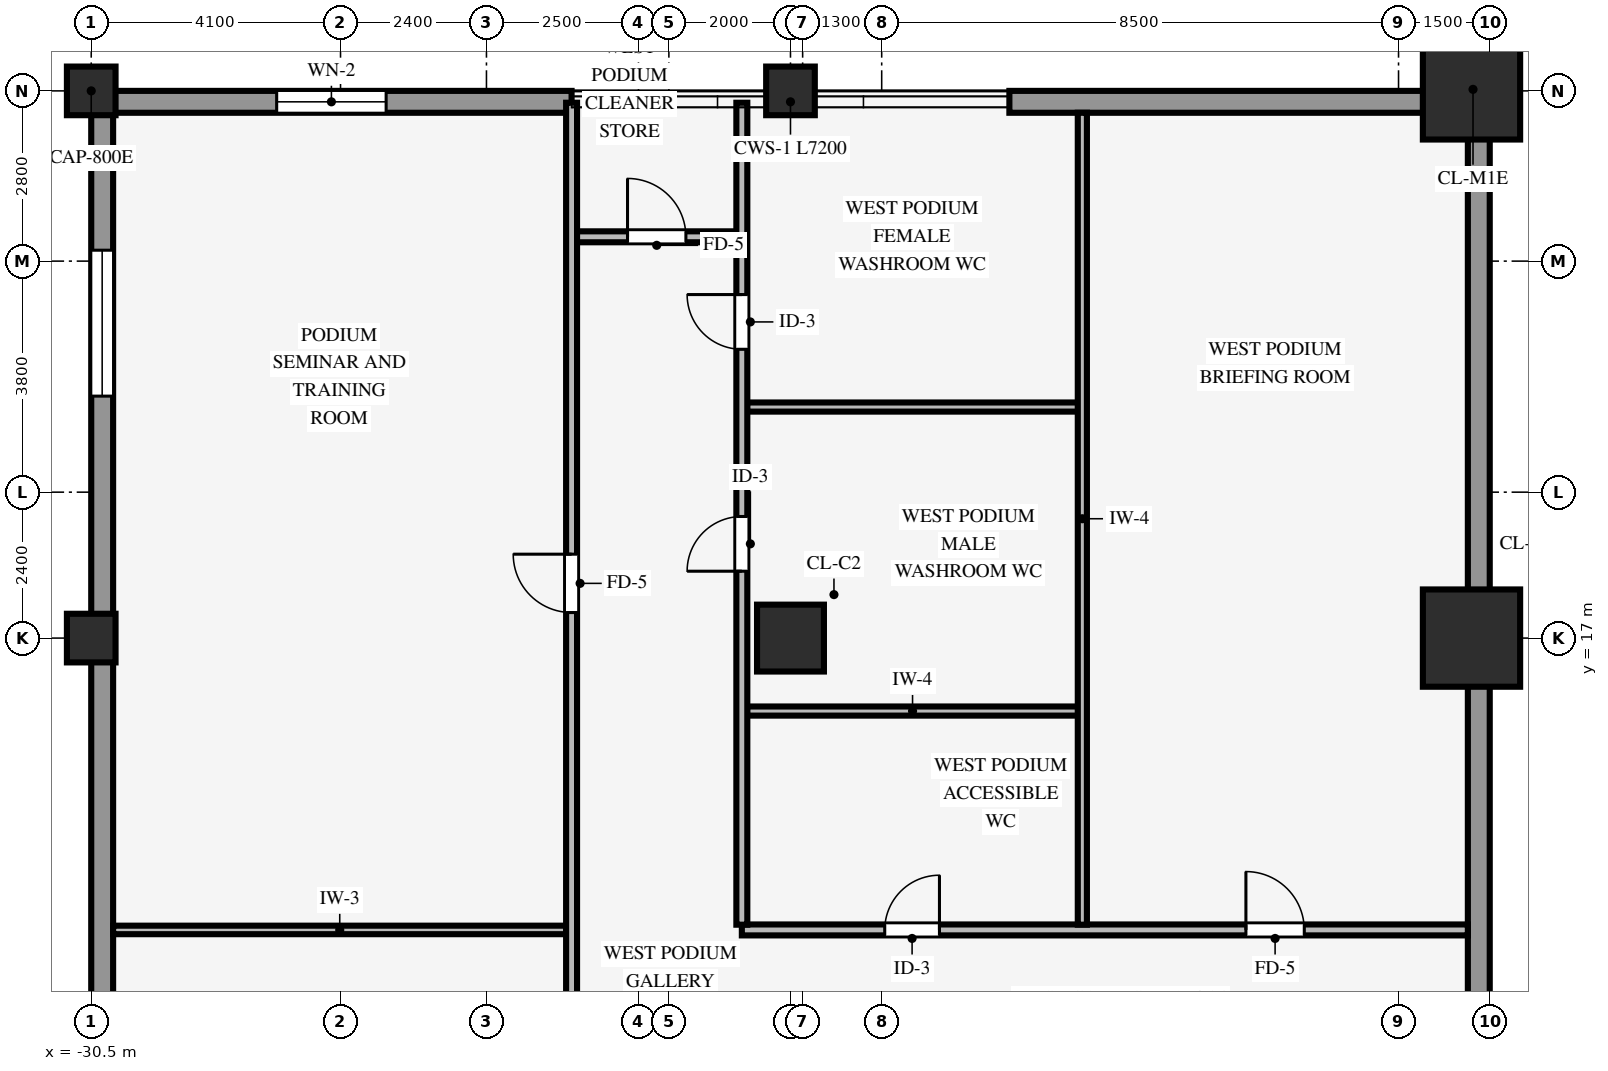
"""IFC4 building model, lengths in metres.
Left out: names, types, materials, properties, quantities, classifications, styles, units other than length and angle.
Written with IfcOpenShell. Run it as: python <this file> out.ifc"""

import sys

from ifc_helpers import new_model, si_unit, direction, frame, frame_2d, origin, origin_2d, place, context, subcontext, project, spatial, rectangle, hollow_rectangle, extrude, source, transform, mapped, element, fill, save


model = new_model("IFC4")
c1 = context("Model", 3, precision=1e-05, world=origin(), true_north=direction((0.0, 1.0)))
c2 = subcontext(c1, "Body", "Model", "MODEL_VIEW")
j1 = project(units=[si_unit("LENGTHUNIT", "METRE"), si_unit("PLANEANGLEUNIT", "RADIAN")], contexts=[c1])
p1 = place(None, origin())
s1 = spatial("IfcSite", under=j1, at=p1, CompositionType="ELEMENT")
p2 = place(p1, origin())
s2 = spatial("IfcBuilding", under=s1, at=p2, CompositionType="ELEMENT")
p3 = place(p2, frame((0.0, 0.0, 13.8)))
s3 = spatial("IfcBuildingStorey", under=s2, at=p3, CompositionType="ELEMENT", Elevation=13.8)
for number, where, z_axis, x_axis in (
    (1, (-7.8, 17.0, 0.0), (0.0, 0.0, 1.0), (1.0, 0.0, 0.0)),
    (2, (-7.8, 26.0, 0.0), (0.0, 0.0, 1.0), (1.0, 0.0, 0.0)),
):
    element("IfcColumn", number, at=place(p3, frame(where, z_axis=z_axis, x_axis=x_axis)), inside=s3, PredefinedType="COLUMN", context=c2, shape_type="SweptSolid", body=[
        extrude(rectangle(XDim=1.6, YDim=1.6, at=origin_2d()), origin(), (0.0, 0.0, 1.0), 4.2),
    ])
for number, where, z_axis, x_axis in (
    (3, (-30.5, 17.0, 0.0), (0.0, 0.0, 1.0), (1.0, 0.0, 0.0)),
    (4, (-30.5, 26.0, 0.0), (0.0, 0.0, 1.0), (1.0, 0.0, 0.0)),
):
    element("IfcColumn", number, at=place(p3, frame(where, z_axis=z_axis, x_axis=x_axis)), inside=s3, PredefinedType="COLUMN", context=c2, shape_type="SweptSolid", body=[
        extrude(hollow_rectangle(XDim=0.8, YDim=0.8, WallThickness=0.055, InnerFilletRadius=0.055, OuterFilletRadius=0.11, at=origin_2d()), origin(), (0.0, 0.0, 1.0), 4.2),
    ])
p4 = place(p3, frame((-19.0, 17.0, 0.0), z_axis=(0.0, 0.0, 1.0), x_axis=(1.0, 0.0, 0.0)))
e5 = element("IfcColumn", 5, at=p4, inside=s3, PredefinedType="COLUMN", context=c2, shape_type="SweptSolid", body=[
    extrude(rectangle(XDim=1.1, YDim=1.1, at=origin_2d()), origin(), (0.0, 0.0, 1.0), 4.2),
])
p5 = place(p3, frame((-19.0, 26.0, 0.0), z_axis=(0.0, 0.0, 1.0), x_axis=(1.0, 0.0, 0.0)))
e6 = element("IfcColumn", 6, at=p5, inside=s3, PredefinedType="COLUMN", context=c2, shape_type="SweptSolid", body=[
    extrude(hollow_rectangle(XDim=0.8, YDim=0.8, WallThickness=0.055, InnerFilletRadius=0.055, OuterFilletRadius=0.11, at=origin_2d()), origin(), (0.0, 0.0, 1.0), 4.2),
])
p6 = place(p3, frame((-7.68, -25.644, 0.0), z_axis=(0.0, 0.0, 1.0), x_axis=(0.0, 1.0, 0.0)))
e7 = element("IfcWall", 7, at=p6, inside=s3, PredefinedType="STANDARD", context=c2, shape_type="SweptSolid", body=[
    extrude(rectangle(XDim=51.288, YDim=0.36, at=frame_2d((25.644, 0.0))), origin(), (0.0, 0.0, 1.0), 2.985),
])
p7 = place(p3, frame((-30.5, 25.82, 0.0), z_axis=(0.0, 0.0, 1.0), x_axis=(1.0, 0.0, 0.0)))
e8 = element("IfcWall", 8, at=p7, inside=s3, PredefinedType="STANDARD", context=c2, shape_type="SweptSolid", body=[
    extrude(rectangle(XDim=7.9, YDim=0.36, at=frame_2d((3.95, 0.0))), origin(), (0.0, 0.0, 1.0), 3.535),
])
p8 = place(p7, frame((3.05, 0.0, 0.85)))
e9 = element("IfcOpeningElement", 9, at=p8, cuts=e8, PredefinedType="OPENING", context=c2, shape_type="SweptSolid", body=[
    extrude(rectangle(XDim=1.8, YDim=2.35, at=frame_2d((0.9, 1.175))), frame((0.0, 0.19, 0.0), z_axis=(0.0, -1.0, 0.0), x_axis=(1.0, 0.0, 0.0)), (0.0, 0.0, 1.0), 0.38),
])
p9 = place(p3, frame((-15.4, 25.82, 0.0), z_axis=(0.0, 0.0, 1.0), x_axis=(1.0, 0.0, 0.0)))
e10 = element("IfcWall", 10, at=p9, inside=s3, PredefinedType="STANDARD", context=c2, shape_type="SweptSolid", body=[
    extrude(rectangle(XDim=7.9, YDim=0.36, at=frame_2d((3.95, 0.0))), origin(), (0.0, 0.0, 1.0), 2.585),
])
p10 = place(p3, frame((-30.32, -25.644, 0.0), z_axis=(0.0, 0.0, 1.0), x_axis=(0.0, 1.0, 0.0)))
e11 = element("IfcWall", 11, at=p10, inside=s3, PredefinedType="STANDARD", context=c2, shape_type="SweptSolid", body=[
    extrude(rectangle(XDim=51.288, YDim=0.36, at=frame_2d((25.644, 0.0))), origin(), (0.0, 0.0, 1.0), 3.535),
])
p11 = place(p10, frame((2.264, 0.0, 0.85)))
e12 = element("IfcOpeningElement", 12, at=p11, cuts=e11, PredefinedType="OPENING", context=c2, shape_type="SweptSolid", body=[
    extrude(rectangle(XDim=2.4, YDim=2.45, at=frame_2d((1.2, 1.225))), frame((0.0, 0.19, 0.0), z_axis=(0.0, -1.0, 0.0), x_axis=(1.0, 0.0, 0.0)), (0.0, 0.0, 1.0), 0.38),
])
p12 = place(p10, frame((17.051, 0.0, 0.85)))
e13 = element("IfcOpeningElement", 13, at=p12, cuts=e11, PredefinedType="OPENING", context=c2, shape_type="SweptSolid", body=[
    extrude(rectangle(XDim=2.4, YDim=2.45, at=frame_2d((1.2, 1.225))), frame((0.0, 0.19, 0.0), z_axis=(0.0, -1.0, 0.0), x_axis=(1.0, 0.0, 0.0)), (0.0, 0.0, 1.0), 0.38),
])
p13 = place(p10, frame((21.979, 0.0, 0.85)))
e14 = element("IfcOpeningElement", 14, at=p13, cuts=e11, PredefinedType="OPENING", context=c2, shape_type="SweptSolid", body=[
    extrude(rectangle(XDim=2.4, YDim=2.45, at=frame_2d((1.2, 1.225))), frame((0.0, 0.19, 0.0), z_axis=(0.0, -1.0, 0.0), x_axis=(1.0, 0.0, 0.0)), (0.0, 0.0, 1.0), 0.38),
])
p14 = place(p10, frame((26.908, 0.0, 0.85)))
e15 = element("IfcOpeningElement", 15, at=p14, cuts=e11, PredefinedType="OPENING", context=c2, shape_type="SweptSolid", body=[
    extrude(rectangle(XDim=2.4, YDim=2.45, at=frame_2d((1.2, 1.225))), frame((0.0, 0.19, 0.0), z_axis=(0.0, -1.0, 0.0), x_axis=(1.0, 0.0, 0.0)), (0.0, 0.0, 1.0), 0.38),
])
p15 = place(p10, frame((31.837, 0.0, 0.85)))
e16 = element("IfcOpeningElement", 16, at=p15, cuts=e11, PredefinedType="OPENING", context=c2, shape_type="SweptSolid", body=[
    extrude(rectangle(XDim=2.4, YDim=2.45, at=frame_2d((1.2, 1.225))), frame((0.0, 0.19, 0.0), z_axis=(0.0, -1.0, 0.0), x_axis=(1.0, 0.0, 0.0)), (0.0, 0.0, 1.0), 0.38),
])
p16 = place(p10, frame((46.624, 0.0, 0.85)))
e17 = element("IfcOpeningElement", 17, at=p16, cuts=e11, PredefinedType="OPENING", context=c2, shape_type="SweptSolid", body=[
    extrude(rectangle(XDim=2.4, YDim=2.45, at=frame_2d((1.2, 1.225))), frame((0.0, 0.19, 0.0), z_axis=(0.0, -1.0, 0.0), x_axis=(1.0, 0.0, 0.0)), (0.0, 0.0, 1.0), 0.38),
])
p17 = place(p3, frame((-30.14, 12.2, 0.0), z_axis=(0.0, 0.0, 1.0), x_axis=(1.0, 0.0, 0.0)))
e18 = element("IfcWall", 18, at=p17, inside=s3, PredefinedType="PARTITIONING", context=c2, shape_type="SweptSolid", body=[
    extrude(rectangle(XDim=7.454, YDim=0.14, at=frame_2d((3.727, 0.0))), origin(), (0.0, 0.0, 1.0), 4.19),
])
p18 = place(p3, frame((-19.8, 12.2, 0.0), z_axis=(0.0, 0.0, 1.0), x_axis=(1.0, 0.0, 0.0)))
e19 = element("IfcWall", 19, at=p18, inside=s3, PredefinedType="PARTITIONING", context=c2, shape_type="SweptSolid", body=[
    extrude(rectangle(XDim=11.94, YDim=0.18, at=frame_2d((5.97, 0.0))), origin(), (0.0, 0.0, 1.0), 4.19),
])
p19 = place(p18, frame((8.29, 0.0, 0.0)))
e20 = element("IfcOpeningElement", 20, at=p19, cuts=e19, PredefinedType="OPENING", context=c2, shape_type="SweptSolid", body=[
    extrude(rectangle(XDim=0.96, YDim=2.1, at=frame_2d((0.48, 1.05))), frame((0.0, 0.1, 0.0), z_axis=(0.0, -1.0, 0.0), x_axis=(1.0, 0.0, 0.0)), (0.0, 0.0, 1.0), 0.2),
])
p20 = place(p18, frame((2.35, 0.0, 0.0)))
e21 = element("IfcOpeningElement", 21, at=p20, cuts=e19, PredefinedType="OPENING", context=c2, shape_type="SweptSolid", body=[
    extrude(rectangle(XDim=0.9, YDim=2.1, at=frame_2d((0.45, 1.05))), frame((0.0, 0.1, 0.0), z_axis=(0.0, -1.0, 0.0), x_axis=(1.0, 0.0, 0.0)), (0.0, 0.0, 1.0), 0.2),
])
for number, where, z_axis, x_axis in (
    (22, (-19.714, 15.8, 0.0), (0.0, 0.0, 1.0), (1.0, 0.0, 0.0)),
    (23, (-19.714, 20.8, 0.0), (0.0, 0.0, 1.0), (1.0, 0.0, 0.0)),
):
    element("IfcWall", number, at=place(p3, frame(where, z_axis=z_axis, x_axis=x_axis)), inside=s3, PredefinedType="PARTITIONING", context=c2, shape_type="SweptSolid", body=[
        extrude(rectangle(XDim=5.443, YDim=0.15, at=frame_2d((2.722, 0.0))), origin(), (0.0, 0.0, 1.0), 4.19),
    ])
p21 = place(p3, frame((-22.514, 23.6, 0.0), z_axis=(0.0, 0.0, 1.0), x_axis=(1.0, 0.0, 0.0)))
e24 = element("IfcWall", 24, at=p21, inside=s3, PredefinedType="PARTITIONING", context=c2, shape_type="SweptSolid", body=[
    extrude(rectangle(XDim=2.628, YDim=0.18, at=frame_2d((1.314, 0.0))), origin(), (0.0, 0.0, 1.0), 4.19),
])
p22 = place(p21, frame((0.834, 0.0, 0.0)))
e25 = element("IfcOpeningElement", 25, at=p22, cuts=e24, PredefinedType="OPENING", context=c2, shape_type="SweptSolid", body=[
    extrude(rectangle(XDim=0.96, YDim=2.1, at=frame_2d((0.48, 1.05))), frame((0.0, 0.1, 0.0), z_axis=(0.0, -1.0, 0.0), x_axis=(1.0, 0.0, 0.0)), (0.0, 0.0, 1.0), 0.2),
])
p23 = place(p3, frame((-22.6, -12.114, 0.0), z_axis=(0.0, 0.0, 1.0), x_axis=(0.0, 1.0, 0.0)))
e26 = element("IfcWall", 26, at=p23, inside=s3, PredefinedType="PARTITIONING", context=c2, shape_type="SweptSolid", body=[
    extrude(rectangle(XDim=37.919, YDim=0.18, at=frame_2d((18.959, 0.0))), origin(), (0.0, 0.0, 1.0), 4.19),
])
p24 = place(p23, frame((11.634, 0.0, 0.0)))
e27 = element("IfcOpeningElement", 27, at=p24, cuts=e26, PredefinedType="OPENING", context=c2, shape_type="SweptSolid", body=[
    extrude(rectangle(XDim=0.96, YDim=2.1, at=frame_2d((0.48, 1.05))), frame((0.0, 0.1, 0.0), z_axis=(0.0, -1.0, 0.0), x_axis=(1.0, 0.0, 0.0)), (0.0, 0.0, 1.0), 0.2),
])
p25 = place(p23, frame((29.534, 0.0, 0.0)))
e28 = element("IfcOpeningElement", 28, at=p25, cuts=e26, PredefinedType="OPENING", context=c2, shape_type="SweptSolid", body=[
    extrude(rectangle(XDim=0.96, YDim=2.1, at=frame_2d((0.48, 1.05))), frame((0.0, 0.1, 0.0), z_axis=(0.0, -1.0, 0.0), x_axis=(1.0, 0.0, 0.0)), (0.0, 0.0, 1.0), 0.2),
])
p26 = place(p3, frame((-19.8, 12.286, 0.0), z_axis=(0.0, 0.0, 1.0), x_axis=(0.0, 1.0, 0.0)))
e29 = element("IfcWall", 29, at=p26, inside=s3, PredefinedType="PARTITIONING", context=c2, shape_type="SweptSolid", body=[
    extrude(rectangle(XDim=13.519, YDim=0.18, at=frame_2d((6.76, 0.0))), origin(), (0.0, 0.0, 1.0), 4.19),
])
p27 = place(p26, frame((5.814, 0.0, 0.0)))
e30 = element("IfcOpeningElement", 30, at=p27, cuts=e29, PredefinedType="OPENING", context=c2, shape_type="SweptSolid", body=[
    extrude(rectangle(XDim=0.9, YDim=2.1, at=frame_2d((0.45, 1.05))), frame((0.0, 0.1, 0.0), z_axis=(0.0, -1.0, 0.0), x_axis=(1.0, 0.0, 0.0)), (0.0, 0.0, 1.0), 0.2),
])
p28 = place(p26, frame((9.464, 0.0, 0.0)))
e31 = element("IfcOpeningElement", 31, at=p28, cuts=e29, PredefinedType="OPENING", context=c2, shape_type="SweptSolid", body=[
    extrude(rectangle(XDim=0.9, YDim=2.1, at=frame_2d((0.45, 1.05))), frame((0.0, 0.1, 0.0), z_axis=(0.0, -1.0, 0.0), x_axis=(1.0, 0.0, 0.0)), (0.0, 0.0, 1.0), 0.2),
])
p29 = place(p3, frame((-14.2, 12.286, 0.0), z_axis=(0.0, 0.0, 1.0), x_axis=(0.0, 1.0, 0.0)))
e32 = element("IfcWall", 32, at=p29, inside=s3, PredefinedType="PARTITIONING", context=c2, shape_type="SweptSolid", body=[
    extrude(rectangle(XDim=13.354, YDim=0.15, at=frame_2d((6.677, 0.0))), origin(), (0.0, 0.0, 1.0), 4.19),
])
m1 = source(origin(), c2, "Body", "SweptSolid", [
    extrude(rectangle(XDim=1.8, YDim=2.35, at=frame_2d((0.9, 1.175))), frame((0.0, 0.03, 0.0), z_axis=(0.0, -1.0, 0.0), x_axis=(1.0, 0.0, 0.0)), (0.0, 0.0, 1.0), 0.06),
])
p30 = place(p8, origin())
e33 = element("IfcWindow", 33, at=p30, inside=s3, PartitioningType="SINGLE_PANEL", PredefinedType="WINDOW", context=c2, shape_type="MappedRepresentation", body=[
    mapped(m1, transform((0.0, 0.0, 0.0), scale=1.0)),
])
fill(e9, e33)
m2 = source(origin(), c2, "Body", "SweptSolid", [
    extrude(rectangle(XDim=2.4, YDim=2.45, at=frame_2d((1.2, 1.225))), frame((0.0, 0.03, 0.0), z_axis=(0.0, -1.0, 0.0), x_axis=(1.0, 0.0, 0.0)), (0.0, 0.0, 1.0), 0.06),
])
p31 = place(p16, origin())
e34 = element("IfcWindow", 34, at=p31, inside=s3, PartitioningType="SINGLE_PANEL", PredefinedType="WINDOW", context=c2, shape_type="MappedRepresentation", body=[
    mapped(m2, transform((0.0, 0.0, 0.0), scale=1.0)),
])
fill(e17, e34)
m3 = source(origin(), c2, "Body", "SweptSolid", [
    extrude(rectangle(XDim=0.96, YDim=2.1, at=frame_2d((0.48, 1.05))), frame((0.0, 0.025, 0.0), z_axis=(0.0, -1.0, 0.0), x_axis=(1.0, 0.0, 0.0)), (0.0, 0.0, 1.0), 0.05),
])
p32 = place(p25, origin())
e35 = element("IfcDoor", 35, at=p32, inside=s3, OperationType="SINGLE_SWING_RIGHT", PredefinedType="DOOR", context=c2, shape_type="MappedRepresentation", body=[
    mapped(m3, transform((0.0, 0.0, 0.0), scale=1.0)),
])
fill(e28, e35)
p33 = place(p19, origin())
e36 = element("IfcDoor", 36, at=p33, inside=s3, OperationType="SINGLE_SWING_LEFT", PredefinedType="DOOR", context=c2, shape_type="MappedRepresentation", body=[
    mapped(m3, transform((0.0, 0.0, 0.0), scale=1.0)),
])
fill(e20, e36)
m4 = source(origin(), c2, "Body", "SweptSolid", [
    extrude(rectangle(XDim=0.9, YDim=2.1, at=frame_2d((0.45, 1.05))), frame((0.0, 0.025, 0.0), z_axis=(0.0, -1.0, 0.0), x_axis=(1.0, 0.0, 0.0)), (0.0, 0.0, 1.0), 0.05),
])
p34 = place(p20, origin())
e37 = element("IfcDoor", 37, at=p34, inside=s3, OperationType="SINGLE_SWING_RIGHT", PredefinedType="DOOR", context=c2, shape_type="MappedRepresentation", body=[
    mapped(m4, transform((0.0, 0.0, 0.0), scale=1.0)),
])
fill(e21, e37)
p35 = place(p27, origin())
e38 = element("IfcDoor", 38, at=p35, inside=s3, OperationType="SINGLE_SWING_LEFT", PredefinedType="DOOR", context=c2, shape_type="MappedRepresentation", body=[
    mapped(m4, transform((0.0, 0.0, 0.0), scale=1.0)),
])
fill(e30, e38)
p36 = place(p28, origin())
e39 = element("IfcDoor", 39, at=p36, inside=s3, OperationType="SINGLE_SWING_RIGHT", PredefinedType="DOOR", context=c2, shape_type="MappedRepresentation", body=[
    mapped(m4, transform((0.0, 0.0, 0.0), scale=1.0)),
])
fill(e31, e39)
p37 = place(p22, origin())
e40 = element("IfcDoor", 40, at=p37, inside=s3, OperationType="SINGLE_SWING_LEFT", PredefinedType="DOOR", context=c2, shape_type="MappedRepresentation", body=[
    mapped(m3, transform((0.0, 0.0, 0.0), scale=1.0)),
])
fill(e25, e40)
save(model, sys.argv[1])
